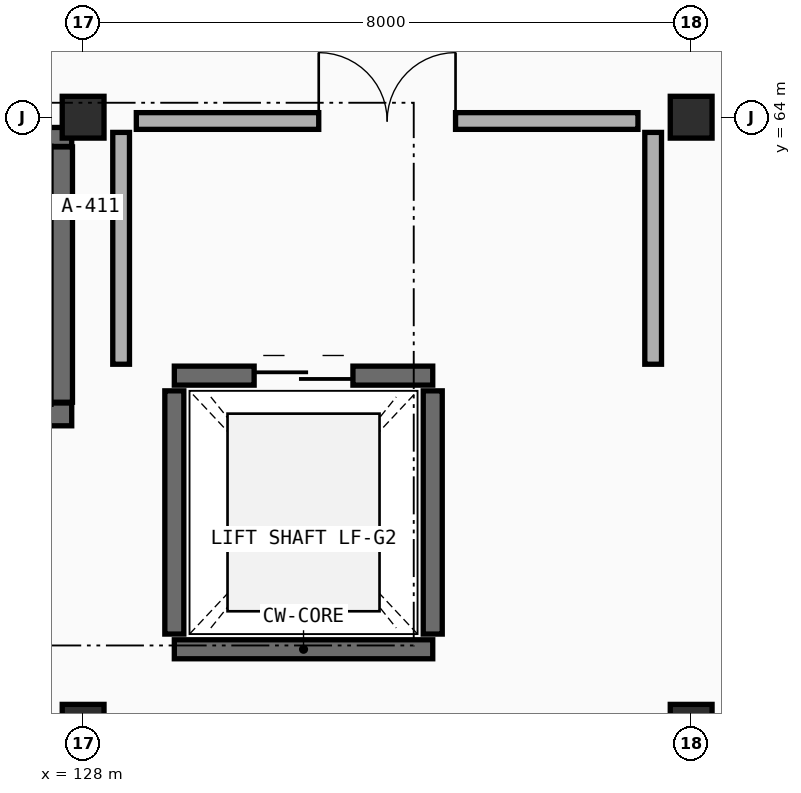
"""IFC4 building model, lengths in metres.
Left out: names, types, materials, properties, quantities, classifications, styles, units other than length and angle.
Written with IfcOpenShell. Run it as: python <this file> out.ifc"""

import sys

from ifc_helpers import new_model, si_unit, direction, frame, frame_2d, origin, origin_2d, place, context, subcontext, project, spatial, rectangle, extrude, element, fill, save


model = new_model("IFC4")
c1 = context("Model", 3, precision=1e-05, world=origin(), true_north=direction((0.0, 1.0)))
c2 = subcontext(c1, "Body", "Model", "MODEL_VIEW")
j1 = project(units=[si_unit("LENGTHUNIT", "METRE"), si_unit("PLANEANGLEUNIT", "RADIAN")], contexts=[c1])
p1 = place(None, origin())
s1 = spatial("IfcSite", under=j1, at=p1, CompositionType="ELEMENT")
p2 = place(p1, origin())
s2 = spatial("IfcBuilding", under=s1, at=p2, CompositionType="ELEMENT")
p3 = place(p2, frame((0.0, 0.0, 26.4)))
s3 = spatial("IfcBuildingStorey", under=s2, at=p3, CompositionType="ELEMENT", Elevation=26.4)
for number, where, z_axis, x_axis in (
    (1, (128.0, 56.0, 0.0), (0.0, 0.0, 1.0), (1.0, 0.0, 0.0)),
    (2, (136.0, 56.0, 0.0), (0.0, 0.0, 1.0), (1.0, 0.0, 0.0)),
    (3, (128.0, 64.0, 0.0), (0.0, 0.0, 1.0), (1.0, 0.0, 0.0)),
    (4, (136.0, 64.0, 0.0), (0.0, 0.0, 1.0), (1.0, 0.0, 0.0)),
):
    element("IfcColumn", number, at=place(p3, frame(where, z_axis=z_axis, x_axis=x_axis)), inside=s3, PredefinedType="COLUMN", context=c2, shape_type="SweptSolid", body=[
        extrude(rectangle(XDim=0.55, YDim=0.55, at=origin_2d()), origin(), (0.0, 0.0, 1.0), 4.2),
    ])
p4 = place(p3, frame((120.2, 60.09, 0.0), z_axis=(0.0, 0.0, 1.0), x_axis=(1.0, 0.0, 0.0)))
e5 = element("IfcWall", 5, at=p4, inside=s3, PredefinedType="SHEAR", context=c2, shape_type="SweptSolid", body=[
    extrude(rectangle(XDim=7.65, YDim=0.3, at=frame_2d((3.825, 0.0))), origin(), (0.0, 0.0, 1.0), 4.2),
])
p5 = place(p3, frame((127.71, 60.25, 0.0), z_axis=(0.0, 0.0, 1.0), x_axis=(0.0, 1.0, 0.0)))
e6 = element("IfcWall", 6, at=p5, inside=s3, PredefinedType="SHEAR", context=c2, shape_type="SweptSolid", body=[
    extrude(rectangle(XDim=3.36, YDim=0.3, at=frame_2d((1.68, 0.0))), origin(), (0.0, 0.0, 1.0), 4.2),
])
p6 = place(p3, frame((120.2, 63.74, 0.0), z_axis=(0.0, 0.0, 1.0), x_axis=(1.0, 0.0, 0.0)))
e7 = element("IfcWall", 7, at=p6, inside=s3, PredefinedType="SOLIDWALL", context=c2, shape_type="SweptSolid", body=[
    extrude(rectangle(XDim=7.65, YDim=0.25, at=frame_2d((3.825, 0.0))), origin(), (0.0, 0.0, 1.0), 4.2),
])
p7 = place(p6, frame((0.65, 0.0, 0.0)))
e8 = element("IfcOpeningElement", 8, at=p7, cuts=e7, PredefinedType="OPENING", context=c2, shape_type="SweptSolid", body=[
    extrude(rectangle(XDim=1.25, YDim=2.15, at=frame_2d((0.625, 1.075))), frame((0.0, 0.135, 0.0), z_axis=(0.0, -1.0, 0.0), x_axis=(1.0, 0.0, 0.0)), (0.0, 0.0, 1.0), 0.27),
])
p8 = place(p3, frame((129.2, 57.0, 0.0), z_axis=(0.0, 0.0, 1.0), x_axis=(1.0, 0.0, 0.0)))
e9 = element("IfcWall", 9, at=p8, inside=s3, PredefinedType="SOLIDWALL", context=c2, shape_type="SweptSolid", body=[
    extrude(rectangle(XDim=3.4, YDim=0.25, at=frame_2d((1.7, 0.0))), origin(), (0.0, 0.0, 1.0), 4.2),
])
p9 = place(p3, frame((129.2, 60.6, 0.0), z_axis=(0.0, 0.0, 1.0), x_axis=(1.0, 0.0, 0.0)))
e10 = element("IfcWall", 10, at=p9, inside=s3, PredefinedType="SOLIDWALL", context=c2, shape_type="SweptSolid", body=[
    extrude(rectangle(XDim=3.4, YDim=0.25, at=frame_2d((1.7, 0.0))), origin(), (0.0, 0.0, 1.0), 4.2),
])
p10 = place(p9, frame((1.05, 0.0, 0.0)))
e11 = element("IfcOpeningElement", 11, at=p10, cuts=e10, PredefinedType="OPENING", context=c2, shape_type="SweptSolid", body=[
    extrude(rectangle(XDim=1.3, YDim=2.2, at=frame_2d((0.65, 1.1))), frame((0.0, 0.135, 0.0), z_axis=(0.0, -1.0, 0.0), x_axis=(1.0, 0.0, 0.0)), (0.0, 0.0, 1.0), 0.27),
])
for number, where, z_axis, x_axis in (
    (12, (129.2, 57.2, 0.0), (0.0, 0.0, 1.0), (0.0, 1.0, 0.0)),
    (13, (132.6, 57.2, 0.0), (0.0, 0.0, 1.0), (0.0, 1.0, 0.0)),
):
    element("IfcWall", number, at=place(p3, frame(where, z_axis=z_axis, x_axis=x_axis)), inside=s3, PredefinedType="SOLIDWALL", context=c2, shape_type="SweptSolid", body=[
        extrude(rectangle(XDim=3.2, YDim=0.25, at=frame_2d((1.6, 0.0))), origin(), (0.0, 0.0, 1.0), 4.2),
    ])
p11 = place(p3, frame((128.7, 63.95, 0.0), z_axis=(0.0, 0.0, 1.0), x_axis=(1.0, 0.0, 0.0)))
e14 = element("IfcWall", 14, at=p11, inside=s3, PredefinedType="PARTITIONING", context=c2, shape_type="SweptSolid", body=[
    extrude(rectangle(XDim=6.6, YDim=0.22, at=frame_2d((3.3, 0.0))), origin(), (0.0, 0.0, 1.0), 3.3),
])
p12 = place(p11, frame((2.4, 0.0, 0.0)))
e15 = element("IfcOpeningElement", 15, at=p12, cuts=e14, PredefinedType="OPENING", context=c2, shape_type="SweptSolid", body=[
    extrude(rectangle(XDim=1.8, YDim=2.2, at=frame_2d((0.9, 1.1))), frame((0.0, 0.12, 0.0), z_axis=(0.0, -1.0, 0.0), x_axis=(1.0, 0.0, 0.0)), (0.0, 0.0, 1.0), 0.24),
])
for number, where, z_axis, x_axis in (
    (16, (128.5, 60.75, 0.0), (0.0, 0.0, 1.0), (0.0, 1.0, 0.0)),
    (17, (135.5, 60.75, 0.0), (0.0, 0.0, 1.0), (0.0, 1.0, 0.0)),
):
    element("IfcWall", number, at=place(p3, frame(where, z_axis=z_axis, x_axis=x_axis)), inside=s3, PredefinedType="PARTITIONING", context=c2, shape_type="SweptSolid", body=[
        extrude(rectangle(XDim=3.05, YDim=0.22, at=frame_2d((1.525, 0.0))), origin(), (0.0, 0.0, 1.0), 3.3),
    ])
p13 = place(p10, origin())
e18 = element("IfcDoor", 18, at=p13, inside=s3, OperationType="DOUBLE_DOOR_SLIDING", PredefinedType="DOOR", context=c2, shape_type="SweptSolid", body=[
    extrude(rectangle(XDim=1.3, YDim=2.2, at=frame_2d((0.65, 1.1))), frame((0.0, 0.025, 0.0), z_axis=(0.0, -1.0, 0.0), x_axis=(1.0, 0.0, 0.0)), (0.0, 0.0, 1.0), 0.05),
])
fill(e11, e18)
p14 = place(p12, origin())
e19 = element("IfcDoor", 19, at=p14, inside=s3, OperationType="DOUBLE_DOOR_SINGLE_SWING", PredefinedType="DOOR", context=c2, shape_type="SweptSolid", body=[
    extrude(rectangle(XDim=1.8, YDim=2.2, at=frame_2d((0.9, 1.1))), frame((0.0, 0.025, 0.0), z_axis=(0.0, -1.0, 0.0), x_axis=(1.0, 0.0, 0.0)), (0.0, 0.0, 1.0), 0.05),
])
fill(e15, e19)
save(model, sys.argv[1])
